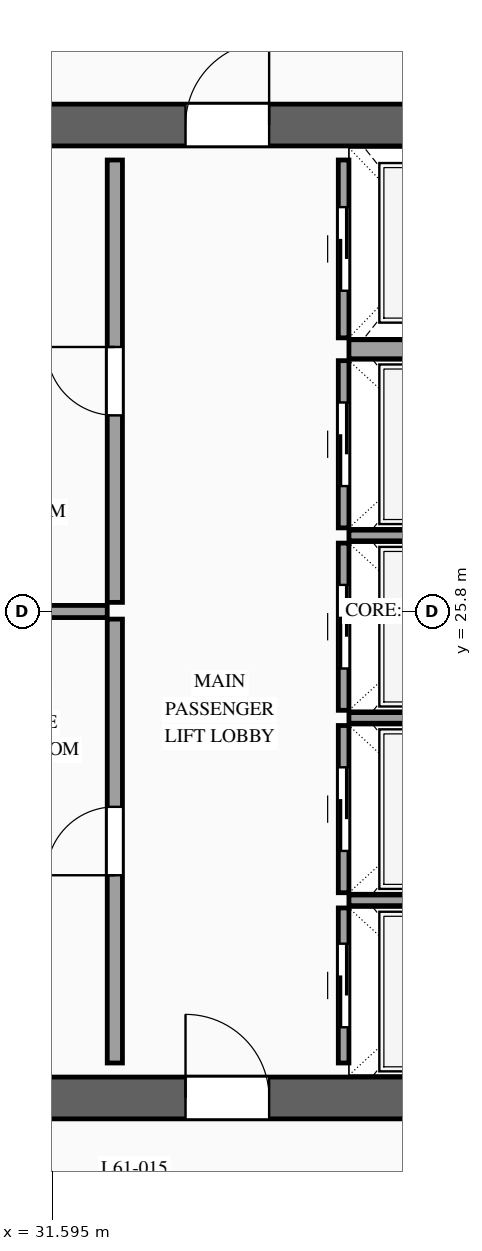
"""IFC4 building model, lengths in metres.
Left out: names, types, materials, properties, quantities, classifications, styles, units other than length and angle.
Written with IfcOpenShell. Run it as: python <this file> out.ifc"""

import sys

from ifc_helpers import new_model, si_unit, direction, frame, frame_2d, origin, place, context, subcontext, project, spatial, rectangle, extrude, source, transform, mapped, element, fill, save


model = new_model("IFC4")
c1 = context("Model", 3, precision=1e-05, world=origin(), true_north=direction((0.0, 1.0)))
c2 = subcontext(c1, "Body", "Model", "MODEL_VIEW")
j1 = project(units=[si_unit("LENGTHUNIT", "METRE"), si_unit("PLANEANGLEUNIT", "RADIAN")], contexts=[c1])
p1 = place(None, origin())
s1 = spatial("IfcSite", under=j1, at=p1, CompositionType="ELEMENT")
p2 = place(p1, origin())
s2 = spatial("IfcBuilding", under=s1, at=p2, CompositionType="ELEMENT")
p3 = place(p2, frame((0.0, 0.0, 231.1)))
s3 = spatial("IfcBuildingStorey", under=s2, at=p3, CompositionType="ELEMENT", Elevation=231.1)
p4 = place(p3, frame((23.525, 19.4, 0.0), z_axis=(0.0, 0.0, 1.0), x_axis=(1.0, 0.0, 0.0)))
e1 = element("IfcWall", 1, at=p4, inside=s3, PredefinedType="SHEAR", context=c2, shape_type="SweptSolid", body=[
    extrude(rectangle(XDim=26.95, YDim=0.55, at=frame_2d((13.475, 0.0))), origin(), (0.0, 0.0, 1.0), 3.5),
])
p5 = place(p4, frame((1.925, 0.0, 0.0)))
e2 = element("IfcOpeningElement", 2, at=p5, cuts=e1, PredefinedType="OPENING", context=c2, shape_type="SweptSolid", body=[
    extrude(rectangle(XDim=1.1, YDim=2.2, at=frame_2d((0.55, 1.1))), frame((0.0, 0.29, 0.0), z_axis=(0.0, -1.0, 0.0), x_axis=(1.0, 0.0, 0.0)), (0.0, 0.0, 1.0), 0.58),
])
p6 = place(p4, frame((9.825, 0.0, 0.0)))
e3 = element("IfcOpeningElement", 3, at=p6, cuts=e1, PredefinedType="OPENING", context=c2, shape_type="SweptSolid", body=[
    extrude(rectangle(XDim=1.1, YDim=2.2, at=frame_2d((0.55, 1.1))), frame((0.0, 0.29, 0.0), z_axis=(0.0, -1.0, 0.0), x_axis=(1.0, 0.0, 0.0)), (0.0, 0.0, 1.0), 0.58),
])
p7 = place(p4, frame((23.025, 0.0, 0.0)))
e4 = element("IfcOpeningElement", 4, at=p7, cuts=e1, PredefinedType="OPENING", context=c2, shape_type="SweptSolid", body=[
    extrude(rectangle(XDim=1.1, YDim=2.2, at=frame_2d((0.55, 1.1))), frame((0.0, 0.29, 0.0), z_axis=(0.0, -1.0, 0.0), x_axis=(1.0, 0.0, 0.0)), (0.0, 0.0, 1.0), 0.58),
])
p8 = place(p4, frame((19.645, 0.0, 0.0)))
e5 = element("IfcOpeningElement", 5, at=p8, cuts=e1, PredefinedType="OPENING", context=c2, shape_type="SweptSolid", body=[
    extrude(rectangle(XDim=0.9, YDim=2.15, at=frame_2d((0.45, 1.075))), frame((0.0, 0.29, 0.0), z_axis=(0.0, -1.0, 0.0), x_axis=(1.0, 0.0, 0.0)), (0.0, 0.0, 1.0), 0.58),
])
p9 = place(p4, frame((18.205, 0.0, 0.0)))
e6 = element("IfcOpeningElement", 6, at=p9, cuts=e1, PredefinedType="OPENING", context=c2, shape_type="SweptSolid", body=[
    extrude(rectangle(XDim=0.9, YDim=2.15, at=frame_2d((0.45, 1.075))), frame((0.0, 0.29, 0.0), z_axis=(0.0, -1.0, 0.0), x_axis=(1.0, 0.0, 0.0)), (0.0, 0.0, 1.0), 0.58),
])
p10 = place(p3, frame((23.525, 32.2, 0.0), z_axis=(0.0, 0.0, 1.0), x_axis=(1.0, 0.0, 0.0)))
e7 = element("IfcWall", 7, at=p10, inside=s3, PredefinedType="SHEAR", context=c2, shape_type="SweptSolid", body=[
    extrude(rectangle(XDim=26.95, YDim=0.55, at=frame_2d((13.475, 0.0))), origin(), (0.0, 0.0, 1.0), 3.5),
])
p11 = place(p10, frame((4.545, 0.0, 0.0)))
e8 = element("IfcOpeningElement", 8, at=p11, cuts=e7, PredefinedType="OPENING", context=c2, shape_type="SweptSolid", body=[
    extrude(rectangle(XDim=0.9, YDim=2.15, at=frame_2d((0.45, 1.075))), frame((0.0, 0.29, 0.0), z_axis=(0.0, -1.0, 0.0), x_axis=(1.0, 0.0, 0.0)), (0.0, 0.0, 1.0), 0.58),
])
p12 = place(p10, frame((9.825, 0.0, 0.0)))
e9 = element("IfcOpeningElement", 9, at=p12, cuts=e7, PredefinedType="OPENING", context=c2, shape_type="SweptSolid", body=[
    extrude(rectangle(XDim=1.1, YDim=2.2, at=frame_2d((0.55, 1.1))), frame((0.0, 0.29, 0.0), z_axis=(0.0, -1.0, 0.0), x_axis=(1.0, 0.0, 0.0)), (0.0, 0.0, 1.0), 0.58),
])
p13 = place(p10, frame((15.675, 0.0, 0.0)))
e10 = element("IfcOpeningElement", 10, at=p13, cuts=e7, PredefinedType="OPENING", context=c2, shape_type="SweptSolid", body=[
    extrude(rectangle(XDim=1.1, YDim=2.2, at=frame_2d((0.55, 1.1))), frame((0.0, 0.29, 0.0), z_axis=(0.0, -1.0, 0.0), x_axis=(1.0, 0.0, 0.0)), (0.0, 0.0, 1.0), 0.58),
])
p14 = place(p10, frame((19.645, 0.0, 0.0)))
e11 = element("IfcOpeningElement", 11, at=p14, cuts=e7, PredefinedType="OPENING", context=c2, shape_type="SweptSolid", body=[
    extrude(rectangle(XDim=0.9, YDim=2.15, at=frame_2d((0.45, 1.075))), frame((0.0, 0.29, 0.0), z_axis=(0.0, -1.0, 0.0), x_axis=(1.0, 0.0, 0.0)), (0.0, 0.0, 1.0), 0.58),
])
p15 = place(p3, frame((35.43, 19.86, 0.0), z_axis=(0.0, 0.0, 1.0), x_axis=(0.0, 1.0, 0.0)))
e12 = element("IfcWall", 12, at=p15, inside=s3, PredefinedType="SOLIDWALL", context=c2, shape_type="SweptSolid", body=[
    extrude(rectangle(XDim=2.04, YDim=0.14, at=frame_2d((1.02, 0.0))), origin(), (0.0, 0.0, 1.0), 3.28),
])
p16 = place(p15, frame((0.47, 0.0, 0.0)))
e13 = element("IfcOpeningElement", 13, at=p16, cuts=e12, PredefinedType="OPENING", context=c2, shape_type="SweptSolid", body=[
    extrude(rectangle(XDim=1.1, YDim=2.2, at=frame_2d((0.55, 1.1))), frame((0.0, 0.085, 0.0), z_axis=(0.0, -1.0, 0.0), x_axis=(1.0, 0.0, 0.0)), (0.0, 0.0, 1.0), 0.17),
])
m1 = source(origin(), c2, "Body", "SweptSolid", [
    extrude(rectangle(XDim=2.4, YDim=0.14, at=frame_2d((1.2, 0.0))), origin(), (0.0, 0.0, 1.0), 3.28),
])
p17 = place(p3, frame((35.5, 22.0, 0.0), z_axis=(0.0, 0.0, 1.0), x_axis=(1.0, 0.0, 0.0)))
e14 = element("IfcWall", 14, at=p17, inside=s3, PredefinedType="SOLIDWALL", context=c2, shape_type="MappedRepresentation", body=[
    mapped(m1, transform((0.0, 0.0, 0.0), scale=1.0)),
])
p18 = place(p3, frame((35.43, 22.1, 0.0), z_axis=(0.0, 0.0, 1.0), x_axis=(0.0, 1.0, 0.0)))
e15 = element("IfcWall", 15, at=p18, inside=s3, PredefinedType="SOLIDWALL", context=c2, shape_type="SweptSolid", body=[
    extrude(rectangle(XDim=2.2, YDim=0.14, at=frame_2d((1.1, 0.0))), origin(), (0.0, 0.0, 1.0), 3.28),
])
p19 = place(p18, frame((0.55, 0.0, 0.0)))
e16 = element("IfcOpeningElement", 16, at=p19, cuts=e15, PredefinedType="OPENING", context=c2, shape_type="SweptSolid", body=[
    extrude(rectangle(XDim=1.1, YDim=2.2, at=frame_2d((0.55, 1.1))), frame((0.0, 0.085, 0.0), z_axis=(0.0, -1.0, 0.0), x_axis=(1.0, 0.0, 0.0)), (0.0, 0.0, 1.0), 0.17),
])
p20 = place(p3, frame((35.5, 24.4, 0.0), z_axis=(0.0, 0.0, 1.0), x_axis=(1.0, 0.0, 0.0)))
e17 = element("IfcWall", 17, at=p20, inside=s3, PredefinedType="SOLIDWALL", context=c2, shape_type="MappedRepresentation", body=[
    mapped(m1, transform((0.0, 0.0, 0.0), scale=1.0)),
])
p21 = place(p3, frame((35.43, 24.5, 0.0), z_axis=(0.0, 0.0, 1.0), x_axis=(0.0, 1.0, 0.0)))
e18 = element("IfcWall", 18, at=p21, inside=s3, PredefinedType="SOLIDWALL", context=c2, shape_type="SweptSolid", body=[
    extrude(rectangle(XDim=2.2, YDim=0.14, at=frame_2d((1.1, 0.0))), origin(), (0.0, 0.0, 1.0), 3.28),
])
p22 = place(p21, frame((0.55, 0.0, 0.0)))
e19 = element("IfcOpeningElement", 19, at=p22, cuts=e18, PredefinedType="OPENING", context=c2, shape_type="SweptSolid", body=[
    extrude(rectangle(XDim=1.1, YDim=2.2, at=frame_2d((0.55, 1.1))), frame((0.0, 0.085, 0.0), z_axis=(0.0, -1.0, 0.0), x_axis=(1.0, 0.0, 0.0)), (0.0, 0.0, 1.0), 0.17),
])
p23 = place(p3, frame((35.5, 26.8, 0.0), z_axis=(0.0, 0.0, 1.0), x_axis=(1.0, 0.0, 0.0)))
e20 = element("IfcWall", 20, at=p23, inside=s3, PredefinedType="SOLIDWALL", context=c2, shape_type="MappedRepresentation", body=[
    mapped(m1, transform((0.0, 0.0, 0.0), scale=1.0)),
])
p24 = place(p3, frame((35.43, 26.9, 0.0), z_axis=(0.0, 0.0, 1.0), x_axis=(0.0, 1.0, 0.0)))
e21 = element("IfcWall", 21, at=p24, inside=s3, PredefinedType="SOLIDWALL", context=c2, shape_type="SweptSolid", body=[
    extrude(rectangle(XDim=2.2, YDim=0.14, at=frame_2d((1.1, 0.0))), origin(), (0.0, 0.0, 1.0), 3.28),
])
p25 = place(p24, frame((0.55, 0.0, 0.0)))
e22 = element("IfcOpeningElement", 22, at=p25, cuts=e21, PredefinedType="OPENING", context=c2, shape_type="SweptSolid", body=[
    extrude(rectangle(XDim=1.1, YDim=2.2, at=frame_2d((0.55, 1.1))), frame((0.0, 0.085, 0.0), z_axis=(0.0, -1.0, 0.0), x_axis=(1.0, 0.0, 0.0)), (0.0, 0.0, 1.0), 0.17),
])
p26 = place(p3, frame((35.43, 29.4, 0.0), z_axis=(0.0, 0.0, 1.0), x_axis=(0.0, 1.0, 0.0)))
e23 = element("IfcWall", 23, at=p26, inside=s3, PredefinedType="SOLIDWALL", context=c2, shape_type="SweptSolid", body=[
    extrude(rectangle(XDim=2.34, YDim=0.14, at=frame_2d((1.17, 0.0))), origin(), (0.0, 0.0, 1.0), 3.28),
])
p27 = place(p26, frame((0.62, 0.0, 0.0)))
e24 = element("IfcOpeningElement", 24, at=p27, cuts=e23, PredefinedType="OPENING", context=c2, shape_type="SweptSolid", body=[
    extrude(rectangle(XDim=1.1, YDim=2.2, at=frame_2d((0.55, 1.1))), frame((0.0, 0.085, 0.0), z_axis=(0.0, -1.0, 0.0), x_axis=(1.0, 0.0, 0.0)), (0.0, 0.0, 1.0), 0.17),
])
m2 = source(origin(), c2, "Body", "SweptSolid", [
    extrude(rectangle(XDim=2.4, YDim=0.25, at=frame_2d((1.2, 0.0))), origin(), (0.0, 0.0, 1.0), 3.28),
])
p28 = place(p3, frame((35.5, 29.25, 0.0), z_axis=(0.0, 0.0, 1.0), x_axis=(1.0, 0.0, 0.0)))
e25 = element("IfcWall", 25, at=p28, inside=s3, PredefinedType="SOLIDWALL", context=c2, shape_type="MappedRepresentation", body=[
    mapped(m2, transform((0.0, 0.0, 0.0), scale=1.0)),
])
p29 = place(p3, frame((32.42, 19.86, 0.0), z_axis=(0.0, 0.0, 1.0), x_axis=(0.0, 1.0, 0.0)))
e26 = element("IfcWall", 26, at=p29, inside=s3, PredefinedType="PARTITIONING", context=c2, shape_type="SweptSolid", body=[
    extrude(rectangle(XDim=5.84, YDim=0.2, at=frame_2d((2.92, 0.0))), origin(), (0.0, 0.0, 1.0), 3.28),
])
p30 = place(p29, frame((2.47, 0.0, 0.0)))
e27 = element("IfcOpeningElement", 27, at=p30, cuts=e26, PredefinedType="OPENING", context=c2, shape_type="SweptSolid", body=[
    extrude(rectangle(XDim=0.9, YDim=2.15, at=frame_2d((0.45, 1.075))), frame((0.0, 0.115, 0.0), z_axis=(0.0, -1.0, 0.0), x_axis=(1.0, 0.0, 0.0)), (0.0, 0.0, 1.0), 0.23),
])
p31 = place(p3, frame((32.42, 25.92, 0.0), z_axis=(0.0, 0.0, 1.0), x_axis=(0.0, 1.0, 0.0)))
e28 = element("IfcWall", 28, at=p31, inside=s3, PredefinedType="PARTITIONING", context=c2, shape_type="SweptSolid", body=[
    extrude(rectangle(XDim=5.82, YDim=0.2, at=frame_2d((2.91, 0.0))), origin(), (0.0, 0.0, 1.0), 3.28),
])
p32 = place(p31, frame((2.46, 0.0, 0.0)))
e29 = element("IfcOpeningElement", 29, at=p32, cuts=e28, PredefinedType="OPENING", context=c2, shape_type="SweptSolid", body=[
    extrude(rectangle(XDim=0.9, YDim=2.15, at=frame_2d((0.45, 1.075))), frame((0.0, 0.115, 0.0), z_axis=(0.0, -1.0, 0.0), x_axis=(1.0, 0.0, 0.0)), (0.0, 0.0, 1.0), 0.23),
])
m3 = source(origin(), c2, "Body", "SweptSolid", [
    extrude(rectangle(XDim=2.47, YDim=0.16, at=frame_2d((1.235, 0.0))), origin(), (0.0, 0.0, 1.0), 3.28),
])
p33 = place(p3, frame((29.85, 25.8, 0.0), z_axis=(0.0, 0.0, 1.0), x_axis=(1.0, 0.0, 0.0)))
e30 = element("IfcWall", 30, at=p33, inside=s3, PredefinedType="PARTITIONING", context=c2, shape_type="MappedRepresentation", body=[
    mapped(m3, transform((0.0, 0.0, 0.0), scale=1.0)),
])
m4 = source(origin(), c2, "Body", "SweptSolid", [
    extrude(rectangle(XDim=1.1, YDim=2.2, at=frame_2d((0.55, 1.1))), frame((0.0, 0.025, 0.0), z_axis=(0.0, -1.0, 0.0), x_axis=(1.0, 0.0, 0.0)), (0.0, 0.0, 1.0), 0.05),
])
p34 = place(p16, origin())
e31 = element("IfcDoor", 31, at=p34, inside=s3, OperationType="SLIDING_TO_RIGHT", PredefinedType="DOOR", context=c2, shape_type="MappedRepresentation", body=[
    mapped(m4, transform((0.0, 0.0, 0.0), scale=1.0)),
])
fill(e13, e31)
p35 = place(p19, origin())
e32 = element("IfcDoor", 32, at=p35, inside=s3, OperationType="SLIDING_TO_LEFT", PredefinedType="DOOR", context=c2, shape_type="MappedRepresentation", body=[
    mapped(m4, transform((0.0, 0.0, 0.0), scale=1.0)),
])
fill(e16, e32)
p36 = place(p22, origin())
e33 = element("IfcDoor", 33, at=p36, inside=s3, OperationType="SLIDING_TO_RIGHT", PredefinedType="DOOR", context=c2, shape_type="MappedRepresentation", body=[
    mapped(m4, transform((0.0, 0.0, 0.0), scale=1.0)),
])
fill(e19, e33)
p37 = place(p25, origin())
e34 = element("IfcDoor", 34, at=p37, inside=s3, OperationType="SLIDING_TO_LEFT", PredefinedType="DOOR", context=c2, shape_type="MappedRepresentation", body=[
    mapped(m4, transform((0.0, 0.0, 0.0), scale=1.0)),
])
fill(e22, e34)
p38 = place(p27, origin())
e35 = element("IfcDoor", 35, at=p38, inside=s3, OperationType="SLIDING_TO_RIGHT", PredefinedType="DOOR", context=c2, shape_type="MappedRepresentation", body=[
    mapped(m4, transform((0.0, 0.0, 0.0), scale=1.0)),
])
fill(e24, e35)
m5 = source(origin(), c2, "Body", "SweptSolid", [
    extrude(rectangle(XDim=1.1, YDim=2.2, at=frame_2d((0.55, 1.1))), frame((0.0, 0.025, 0.0), z_axis=(0.0, -1.0, 0.0), x_axis=(1.0, 0.0, 0.0)), (0.0, 0.0, 1.0), 0.05),
])
p39 = place(p6, origin())
e36 = element("IfcDoor", 36, at=p39, inside=s3, OperationType="SINGLE_SWING_LEFT", PredefinedType="DOOR", context=c2, shape_type="MappedRepresentation", body=[
    mapped(m5, transform((0.0, 0.0, 0.0), scale=1.0)),
])
fill(e3, e36)
p40 = place(p12, origin())
e37 = element("IfcDoor", 37, at=p40, inside=s3, OperationType="SINGLE_SWING_RIGHT", PredefinedType="DOOR", context=c2, shape_type="MappedRepresentation", body=[
    mapped(m5, transform((0.0, 0.0, 0.0), scale=1.0)),
])
fill(e9, e37)
m6 = source(origin(), c2, "Body", "SweptSolid", [
    extrude(rectangle(XDim=0.9, YDim=2.15, at=frame_2d((0.45, 1.075))), frame((0.0, 0.025, 0.0), z_axis=(0.0, -1.0, 0.0), x_axis=(1.0, 0.0, 0.0)), (0.0, 0.0, 1.0), 0.05),
])
p41 = place(p30, origin())
e38 = element("IfcDoor", 38, at=p41, inside=s3, OperationType="SINGLE_SWING_LEFT", PredefinedType="DOOR", context=c2, shape_type="MappedRepresentation", body=[
    mapped(m6, transform((0.0, 0.0, 0.0), scale=1.0)),
])
fill(e27, e38)
p42 = place(p32, origin())
e39 = element("IfcDoor", 39, at=p42, inside=s3, OperationType="SINGLE_SWING_RIGHT", PredefinedType="DOOR", context=c2, shape_type="MappedRepresentation", body=[
    mapped(m6, transform((0.0, 0.0, 0.0), scale=1.0)),
])
fill(e29, e39)
save(model, sys.argv[1])
